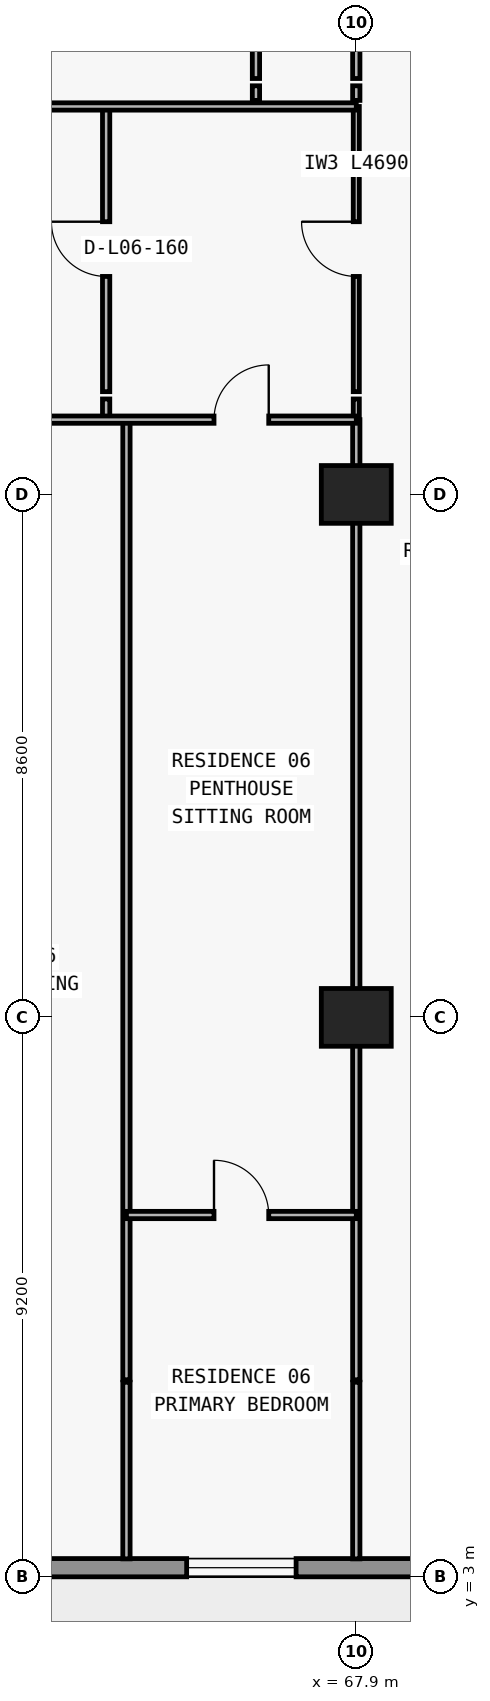
"""IFC4 building model, lengths in metres.
Left out: names, types, materials, properties, quantities, classifications, styles, units other than length and angle.
Written with IfcOpenShell. Run it as: python <this file> out.ifc"""

import sys

from ifc_helpers import new_model, si_unit, direction, frame, frame_2d, origin, origin_2d, place, context, subcontext, project, spatial, rectangle, extrude, element, fill, save


model = new_model("IFC4")
c1 = context("Model", 3, precision=1e-05, world=origin(), true_north=direction((0.0, 1.0)))
c2 = subcontext(c1, "Body", "Model", "MODEL_VIEW")
j1 = project(units=[si_unit("LENGTHUNIT", "METRE"), si_unit("PLANEANGLEUNIT", "RADIAN")], contexts=[c1])
p1 = place(None, origin())
s1 = spatial("IfcSite", under=j1, at=p1, CompositionType="ELEMENT")
p2 = place(p1, origin())
s2 = spatial("IfcBuilding", under=s1, at=p2, CompositionType="ELEMENT")
p3 = place(p2, frame((0.0, 0.0, 30.0)))
s3 = spatial("IfcBuildingStorey", under=s2, at=p3, CompositionType="ELEMENT", Elevation=30.0)
for number, where, z_axis, x_axis in (
    (1, (67.9, 12.2, 0.0), (0.0, 0.0, 1.0), (1.0, 0.0, 0.0)),
    (2, (67.9, 20.8, 0.0), (0.0, 0.0, 1.0), (1.0, 0.0, 0.0)),
):
    element("IfcColumn", number, at=place(p3, frame(where, z_axis=z_axis, x_axis=x_axis)), inside=s3, PredefinedType="COLUMN", context=c2, shape_type="SweptSolid", body=[
        extrude(rectangle(XDim=1.15, YDim=0.95, at=origin_2d()), origin(), (0.0, 0.0, 1.0), 3.05),
    ])
p4 = place(p3, frame((72.7, 3.15, 0.0), z_axis=(0.0, 0.0, 1.0), x_axis=(-1.0, 0.0, 0.0)))
e3 = element("IfcWall", 3, at=p4, inside=s3, PredefinedType="STANDARD", context=c2, shape_type="SweptSolid", body=[
    extrude(rectangle(XDim=67.6, YDim=0.3, at=frame_2d((33.8, 0.0))), origin(), (0.0, 0.0, 1.0), 3.05),
])
p5 = place(p4, frame((59.826, 0.0, 0.0)))
e4 = element("IfcOpeningElement", 4, at=p5, cuts=e3, PredefinedType="OPENING", context=c2, shape_type="SweptSolid", body=[
    extrude(rectangle(XDim=2.0, YDim=2.3, at=frame_2d((1.0, 1.15))), frame((0.0, 0.16, 0.0), z_axis=(0.0, -1.0, 0.0), x_axis=(1.0, 0.0, 0.0)), (0.0, 0.0, 1.0), 0.32),
])
p6 = place(p4, frame((55.526, 0.0, 0.85)))
e5 = element("IfcOpeningElement", 5, at=p6, cuts=e3, PredefinedType="OPENING", context=c2, shape_type="SweptSolid", body=[
    extrude(rectangle(XDim=2.2, YDim=1.55, at=frame_2d((1.1, 0.775))), frame((0.0, 0.16, 0.0), z_axis=(0.0, -1.0, 0.0), x_axis=(1.0, 0.0, 0.0)), (0.0, 0.0, 1.0), 0.32),
])
p7 = place(p4, frame((51.09, 0.0, 0.0)))
e6 = element("IfcOpeningElement", 6, at=p7, cuts=e3, PredefinedType="OPENING", context=c2, shape_type="SweptSolid", body=[
    extrude(rectangle(XDim=2.0, YDim=2.3, at=frame_2d((1.0, 1.15))), frame((0.0, 0.16, 0.0), z_axis=(0.0, -1.0, 0.0), x_axis=(1.0, 0.0, 0.0)), (0.0, 0.0, 1.0), 0.32),
])
p8 = place(p4, frame((46.99, 0.0, 0.85)))
e7 = element("IfcOpeningElement", 7, at=p8, cuts=e3, PredefinedType="OPENING", context=c2, shape_type="SweptSolid", body=[
    extrude(rectangle(XDim=1.8, YDim=1.55, at=frame_2d((0.9, 0.775))), frame((0.0, 0.16, 0.0), z_axis=(0.0, -1.0, 0.0), x_axis=(1.0, 0.0, 0.0)), (0.0, 0.0, 1.0), 0.32),
])
p9 = place(p4, frame((43.026, 0.0, 0.0)))
e8 = element("IfcOpeningElement", 8, at=p9, cuts=e3, PredefinedType="OPENING", context=c2, shape_type="SweptSolid", body=[
    extrude(rectangle(XDim=2.0, YDim=2.3, at=frame_2d((1.0, 1.15))), frame((0.0, 0.16, 0.0), z_axis=(0.0, -1.0, 0.0), x_axis=(1.0, 0.0, 0.0)), (0.0, 0.0, 1.0), 0.32),
])
p10 = place(p4, frame((38.726, 0.0, 0.85)))
e9 = element("IfcOpeningElement", 9, at=p10, cuts=e3, PredefinedType="OPENING", context=c2, shape_type="SweptSolid", body=[
    extrude(rectangle(XDim=2.2, YDim=1.55, at=frame_2d((1.1, 0.775))), frame((0.0, 0.16, 0.0), z_axis=(0.0, -1.0, 0.0), x_axis=(1.0, 0.0, 0.0)), (0.0, 0.0, 1.0), 0.32),
])
p11 = place(p4, frame((34.69, 0.0, 0.0)))
e10 = element("IfcOpeningElement", 10, at=p11, cuts=e3, PredefinedType="OPENING", context=c2, shape_type="SweptSolid", body=[
    extrude(rectangle(XDim=2.0, YDim=2.3, at=frame_2d((1.0, 1.15))), frame((0.0, 0.16, 0.0), z_axis=(0.0, -1.0, 0.0), x_axis=(1.0, 0.0, 0.0)), (0.0, 0.0, 1.0), 0.32),
])
p12 = place(p4, frame((30.81, 0.0, 0.65)))
e11 = element("IfcOpeningElement", 11, at=p12, cuts=e3, PredefinedType="OPENING", context=c2, shape_type="SweptSolid", body=[
    extrude(rectangle(XDim=2.6, YDim=1.85, at=frame_2d((1.3, 0.925))), frame((0.0, 0.16, 0.0), z_axis=(0.0, -1.0, 0.0), x_axis=(1.0, 0.0, 0.0)), (0.0, 0.0, 1.0), 0.32),
])
p13 = place(p4, frame((24.7, 0.0, 0.85)))
e12 = element("IfcOpeningElement", 12, at=p13, cuts=e3, PredefinedType="OPENING", context=c2, shape_type="SweptSolid", body=[
    extrude(rectangle(XDim=2.2, YDim=1.55, at=frame_2d((1.1, 0.775))), frame((0.0, 0.16, 0.0), z_axis=(0.0, -1.0, 0.0), x_axis=(1.0, 0.0, 0.0)), (0.0, 0.0, 1.0), 0.32),
])
p14 = place(p4, frame((18.626, 0.0, 0.0)))
e13 = element("IfcOpeningElement", 13, at=p14, cuts=e3, PredefinedType="OPENING", context=c2, shape_type="SweptSolid", body=[
    extrude(rectangle(XDim=2.0, YDim=2.3, at=frame_2d((1.0, 1.15))), frame((0.0, 0.16, 0.0), z_axis=(0.0, -1.0, 0.0), x_axis=(1.0, 0.0, 0.0)), (0.0, 0.0, 1.0), 0.32),
])
p15 = place(p4, frame((14.326, 0.0, 0.85)))
e14 = element("IfcOpeningElement", 14, at=p15, cuts=e3, PredefinedType="OPENING", context=c2, shape_type="SweptSolid", body=[
    extrude(rectangle(XDim=2.2, YDim=1.55, at=frame_2d((1.1, 0.775))), frame((0.0, 0.16, 0.0), z_axis=(0.0, -1.0, 0.0), x_axis=(1.0, 0.0, 0.0)), (0.0, 0.0, 1.0), 0.32),
])
p16 = place(p4, frame((9.89, 0.0, 0.0)))
e15 = element("IfcOpeningElement", 15, at=p16, cuts=e3, PredefinedType="OPENING", context=c2, shape_type="SweptSolid", body=[
    extrude(rectangle(XDim=2.0, YDim=2.3, at=frame_2d((1.0, 1.15))), frame((0.0, 0.16, 0.0), z_axis=(0.0, -1.0, 0.0), x_axis=(1.0, 0.0, 0.0)), (0.0, 0.0, 1.0), 0.32),
])
p17 = place(p4, frame((5.79, 0.0, 0.85)))
e16 = element("IfcOpeningElement", 16, at=p17, cuts=e3, PredefinedType="OPENING", context=c2, shape_type="SweptSolid", body=[
    extrude(rectangle(XDim=1.8, YDim=1.55, at=frame_2d((0.9, 0.775))), frame((0.0, 0.16, 0.0), z_axis=(0.0, -1.0, 0.0), x_axis=(1.0, 0.0, 0.0)), (0.0, 0.0, 1.0), 0.32),
])
p18 = place(p3, frame((63.786, 22.03, 0.0), z_axis=(0.0, 0.0, 1.0), x_axis=(0.0, 1.0, 0.0)))
e17 = element("IfcWall", 17, at=p18, inside=s3, PredefinedType="PARTITIONING", context=c2, shape_type="SweptSolid", body=[
    extrude(rectangle(XDim=0.34, YDim=0.12, at=frame_2d((0.17, 0.0))), origin(), (0.0, 0.0, 1.0), 3.05),
])
p19 = place(p3, frame((63.786, 22.49, 0.0), z_axis=(0.0, 0.0, 1.0), x_axis=(0.0, 1.0, 0.0)))
e18 = element("IfcWall", 18, at=p19, inside=s3, PredefinedType="PARTITIONING", context=c2, shape_type="SweptSolid", body=[
    extrude(rectangle(XDim=4.69, YDim=0.12, at=frame_2d((2.345, 0.0))), origin(), (0.0, 0.0, 1.0), 3.05),
])
p20 = place(p19, frame((1.895, 0.0, 0.0)))
e19 = element("IfcOpeningElement", 19, at=p20, cuts=e18, PredefinedType="OPENING", context=c2, shape_type="SweptSolid", body=[
    extrude(rectangle(XDim=0.9, YDim=2.15, at=frame_2d((0.45, 1.075))), frame((0.0, 0.07, 0.0), z_axis=(0.0, -1.0, 0.0), x_axis=(1.0, 0.0, 0.0)), (0.0, 0.0, 1.0), 0.14),
])
p21 = place(p3, frame((64.12, 3.295, 0.0), z_axis=(0.0, 0.0, 1.0), x_axis=(0.0, 1.0, 0.0)))
e20 = element("IfcWall", 20, at=p21, inside=s3, PredefinedType="PARTITIONING", context=c2, shape_type="SweptSolid", body=[
    extrude(rectangle(XDim=2.905, YDim=0.12, at=frame_2d((1.453, 0.0))), origin(), (0.0, 0.0, 1.0), 3.05),
])
p22 = place(p3, frame((64.12, 6.24, 0.0), z_axis=(0.0, 0.0, 1.0), x_axis=(0.0, 1.0, 0.0)))
e21 = element("IfcWall", 21, at=p22, inside=s3, PredefinedType="PARTITIONING", context=c2, shape_type="SweptSolid", body=[
    extrude(rectangle(XDim=15.79, YDim=0.12, at=frame_2d((7.895, 0.0))), origin(), (0.0, 0.0, 1.0), 3.05),
])
p23 = place(p3, frame((66.25, 27.28, 0.0), z_axis=(0.0, 0.0, 1.0), x_axis=(0.0, 1.0, 0.0)))
e22 = element("IfcWall", 22, at=p23, inside=s3, PredefinedType="PARTITIONING", context=c2, shape_type="SweptSolid", body=[
    extrude(rectangle(XDim=0.24, YDim=0.12, at=frame_2d((0.12, 0.0))), origin(), (0.0, 0.0, 1.0), 3.05),
])
p24 = place(p3, frame((66.25, 27.64, 0.0), z_axis=(0.0, 0.0, 1.0), x_axis=(0.0, 1.0, 0.0)))
e23 = element("IfcWall", 23, at=p24, inside=s3, PredefinedType="PARTITIONING", context=c2, shape_type="SweptSolid", body=[
    extrude(rectangle(XDim=6.86, YDim=0.12, at=frame_2d((3.43, 0.0))), origin(), (0.0, 0.0, 1.0), 3.05),
])
p25 = place(p24, frame((3.005, 0.0, 0.0)))
e24 = element("IfcOpeningElement", 24, at=p25, cuts=e23, PredefinedType="OPENING", context=c2, shape_type="SweptSolid", body=[
    extrude(rectangle(XDim=0.85, YDim=2.1, at=frame_2d((0.425, 1.05))), frame((0.0, 0.07, 0.0), z_axis=(0.0, -1.0, 0.0), x_axis=(1.0, 0.0, 0.0)), (0.0, 0.0, 1.0), 0.14),
])
p26 = place(p3, frame((67.9, 3.295, 0.0), z_axis=(0.0, 0.0, 1.0), x_axis=(0.0, 1.0, 0.0)))
e25 = element("IfcWall", 25, at=p26, inside=s3, PredefinedType="PARTITIONING", context=c2, shape_type="SweptSolid", body=[
    extrude(rectangle(XDim=2.905, YDim=0.12, at=frame_2d((1.453, 0.0))), origin(), (0.0, 0.0, 1.0), 3.05),
])
p27 = place(p3, frame((67.9, 6.24, 0.0), z_axis=(0.0, 0.0, 1.0), x_axis=(0.0, 1.0, 0.0)))
e26 = element("IfcWall", 26, at=p27, inside=s3, PredefinedType="PARTITIONING", context=c2, shape_type="SweptSolid", body=[
    extrude(rectangle(XDim=15.79, YDim=0.12, at=frame_2d((7.895, 0.0))), origin(), (0.0, 0.0, 1.0), 2.11),
])
p28 = place(p3, frame((67.9, 22.035, 0.0), z_axis=(0.0, 0.0, 1.0), x_axis=(0.0, 1.0, 0.0)))
e27 = element("IfcWall", 27, at=p28, inside=s3, PredefinedType="MOVABLE", context=c2, shape_type="SweptSolid", body=[
    extrude(rectangle(XDim=0.335, YDim=0.1, at=frame_2d((0.167, 0.0))), origin(), (0.0, 0.0, 1.0), 2.11),
])
p29 = place(p3, frame((67.9, 22.49, 0.0), z_axis=(0.0, 0.0, 1.0), x_axis=(0.0, 1.0, 0.0)))
e28 = element("IfcWall", 28, at=p29, inside=s3, PredefinedType="MOVABLE", context=c2, shape_type="SweptSolid", body=[
    extrude(rectangle(XDim=4.69, YDim=0.1, at=frame_2d((2.345, 0.0))), origin(), (0.0, 0.0, 1.0), 2.11),
])
p30 = place(p29, frame((1.895, 0.0, 0.0)))
e29 = element("IfcOpeningElement", 29, at=p30, cuts=e28, PredefinedType="OPENING", context=c2, shape_type="SweptSolid", body=[
    extrude(rectangle(XDim=0.9, YDim=2.06, at=frame_2d((0.45, 1.03))), frame((0.0, 0.06, 0.0), z_axis=(0.0, -1.0, 0.0), x_axis=(1.0, 0.0, 0.0)), (0.0, 0.0, 1.0), 0.12),
])
p31 = place(p3, frame((67.9, 27.28, 0.0), z_axis=(0.0, 0.0, 1.0), x_axis=(0.0, 1.0, 0.0)))
e30 = element("IfcWall", 30, at=p31, inside=s3, PredefinedType="PARTITIONING", context=c2, shape_type="SweptSolid", body=[
    extrude(rectangle(XDim=0.24, YDim=0.12, at=frame_2d((0.12, 0.0))), origin(), (0.0, 0.0, 1.0), 2.11),
])
p32 = place(p3, frame((67.9, 27.64, 0.0), z_axis=(0.0, 0.0, 1.0), x_axis=(0.0, 1.0, 0.0)))
e31 = element("IfcWall", 31, at=p32, inside=s3, PredefinedType="PARTITIONING", context=c2, shape_type="SweptSolid", body=[
    extrude(rectangle(XDim=6.86, YDim=0.12, at=frame_2d((3.43, 0.0))), origin(), (0.0, 0.0, 1.0), 2.11),
])
p33 = place(p3, frame((64.12, 8.95, 0.0), z_axis=(0.0, 0.0, 1.0), x_axis=(1.0, 0.0, 0.0)))
e32 = element("IfcWall", 32, at=p33, inside=s3, PredefinedType="PARTITIONING", context=c2, shape_type="SweptSolid", body=[
    extrude(rectangle(XDim=3.78, YDim=0.12, at=frame_2d((1.89, 0.0))), origin(), (0.0, 0.0, 1.0), 3.05),
])
p34 = place(p33, frame((1.44, 0.0, 0.0)))
e33 = element("IfcOpeningElement", 33, at=p34, cuts=e32, PredefinedType="OPENING", context=c2, shape_type="SweptSolid", body=[
    extrude(rectangle(XDim=0.9, YDim=2.15, at=frame_2d((0.45, 1.075))), frame((0.0, 0.07, 0.0), z_axis=(0.0, -1.0, 0.0), x_axis=(1.0, 0.0, 0.0)), (0.0, 0.0, 1.0), 0.14),
])
p35 = place(p3, frame((59.5, 22.03, 0.0), z_axis=(0.0, 0.0, 1.0), x_axis=(1.0, 0.0, 0.0)))
e34 = element("IfcWall", 34, at=p35, inside=s3, PredefinedType="PARTITIONING", context=c2, shape_type="SweptSolid", body=[
    extrude(rectangle(XDim=8.4, YDim=0.12, at=frame_2d((4.2, 0.0))), origin(), (0.0, 0.0, 1.0), 3.05),
])
p36 = place(p35, frame((1.693, 0.0, 0.0)))
e35 = element("IfcOpeningElement", 35, at=p36, cuts=e34, PredefinedType="OPENING", context=c2, shape_type="SweptSolid", body=[
    extrude(rectangle(XDim=0.9, YDim=2.15, at=frame_2d((0.45, 1.075))), frame((0.0, 0.07, 0.0), z_axis=(0.0, -1.0, 0.0), x_axis=(1.0, 0.0, 0.0)), (0.0, 0.0, 1.0), 0.14),
])
p37 = place(p35, frame((6.06, 0.0, 0.0)))
e36 = element("IfcOpeningElement", 36, at=p37, cuts=e34, PredefinedType="OPENING", context=c2, shape_type="SweptSolid", body=[
    extrude(rectangle(XDim=0.9, YDim=2.15, at=frame_2d((0.45, 1.075))), frame((0.0, 0.07, 0.0), z_axis=(0.0, -1.0, 0.0), x_axis=(1.0, 0.0, 0.0)), (0.0, 0.0, 1.0), 0.14),
])
p38 = place(p3, frame((59.5, 27.18, 0.0), z_axis=(0.0, 0.0, 1.0), x_axis=(1.0, 0.0, 0.0)))
e37 = element("IfcWall", 37, at=p38, inside=s3, PredefinedType="PARTITIONING", context=c2, shape_type="SweptSolid", body=[
    extrude(rectangle(XDim=8.4, YDim=0.12, at=frame_2d((4.2, 0.0))), origin(), (0.0, 0.0, 1.0), 3.05),
])
p39 = place(p38, frame((1.693, 0.0, 0.0)))
e38 = element("IfcOpeningElement", 38, at=p39, cuts=e37, PredefinedType="OPENING", context=c2, shape_type="SweptSolid", body=[
    extrude(rectangle(XDim=0.9, YDim=2.15, at=frame_2d((0.45, 1.075))), frame((0.0, 0.07, 0.0), z_axis=(0.0, -1.0, 0.0), x_axis=(1.0, 0.0, 0.0)), (0.0, 0.0, 1.0), 0.14),
])
p40 = place(p17, origin())
e39 = element("IfcWindow", 39, at=p40, inside=s3, PartitioningType="SINGLE_PANEL", PredefinedType="WINDOW", context=c2, shape_type="SweptSolid", body=[
    extrude(rectangle(XDim=1.8, YDim=1.55, at=frame_2d((0.9, 0.775))), frame((0.0, 0.03, 0.0), z_axis=(0.0, -1.0, 0.0), x_axis=(1.0, 0.0, 0.0)), (0.0, 0.0, 1.0), 0.06),
])
fill(e16, e39)
p41 = place(p20, origin())
e40 = element("IfcDoor", 40, at=p41, inside=s3, OperationType="SINGLE_SWING_RIGHT", PredefinedType="DOOR", context=c2, shape_type="SweptSolid", body=[
    extrude(rectangle(XDim=0.9, YDim=2.15, at=frame_2d((0.45, 1.075))), frame((0.0, 0.025, 0.0), z_axis=(0.0, -1.0, 0.0), x_axis=(1.0, 0.0, 0.0)), (0.0, 0.0, 1.0), 0.05),
])
fill(e19, e40)
p42 = place(p37, origin())
e41 = element("IfcDoor", 41, at=p42, inside=s3, OperationType="SINGLE_SWING_RIGHT", PredefinedType="DOOR", context=c2, shape_type="SweptSolid", body=[
    extrude(rectangle(XDim=0.9, YDim=2.15, at=frame_2d((0.45, 1.075))), frame((0.0, 0.025, 0.0), z_axis=(0.0, -1.0, 0.0), x_axis=(1.0, 0.0, 0.0)), (0.0, 0.0, 1.0), 0.05),
])
fill(e36, e41)
p43 = place(p34, origin())
e42 = element("IfcDoor", 42, at=p43, inside=s3, OperationType="SINGLE_SWING_LEFT", PredefinedType="DOOR", context=c2, shape_type="SweptSolid", body=[
    extrude(rectangle(XDim=0.9, YDim=2.15, at=frame_2d((0.45, 1.075))), frame((0.0, 0.025, 0.0), z_axis=(0.0, -1.0, 0.0), x_axis=(1.0, 0.0, 0.0)), (0.0, 0.0, 1.0), 0.05),
])
fill(e33, e42)
p44 = place(p30, origin())
e43 = element("IfcDoor", 43, at=p44, inside=s3, OperationType="SINGLE_SWING_RIGHT", PredefinedType="DOOR", context=c2, shape_type="SweptSolid", body=[
    extrude(rectangle(XDim=0.9, YDim=2.06, at=frame_2d((0.45, 1.03))), frame((0.0, 0.025, 0.0), z_axis=(0.0, -1.0, 0.0), x_axis=(1.0, 0.0, 0.0)), (0.0, 0.0, 1.0), 0.05),
])
fill(e29, e43)
save(model, sys.argv[1])
